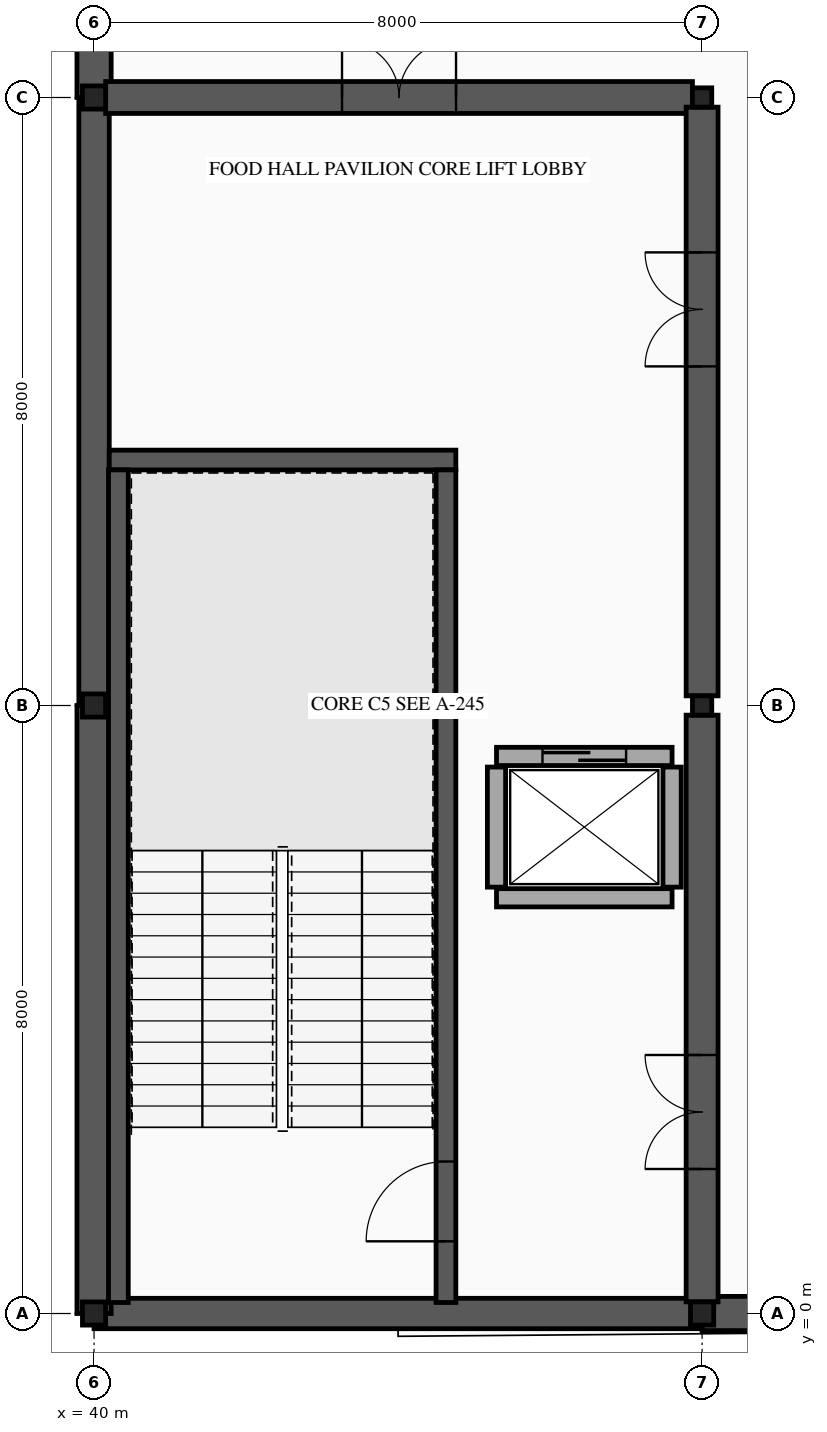
"""IFC4 building model, lengths in metres.
Left out: names, types, materials, properties, quantities, classifications, styles, units other than length and angle.
Written with IfcOpenShell. Run it as: python <this file> out.ifc"""

import sys

from ifc_helpers import new_model, si_unit, direction, frame, frame_2d, origin, origin_2d, place, context, subcontext, project, spatial, rectangle, hollow_rectangle, extrude, element, fill, save


model = new_model("IFC4")
c1 = context("Model", 3, precision=1e-05, world=origin(), true_north=direction((0.0, 1.0)))
c2 = subcontext(c1, "Body", "Model", "MODEL_VIEW")
j1 = project(units=[si_unit("LENGTHUNIT", "METRE"), si_unit("PLANEANGLEUNIT", "RADIAN")], contexts=[c1])
p1 = place(None, origin())
s1 = spatial("IfcSite", under=j1, at=p1, CompositionType="ELEMENT")
p2 = place(p1, origin())
s2 = spatial("IfcBuilding", under=s1, at=p2, CompositionType="ELEMENT")
p3 = place(p2, frame((0.0, 0.0, -4.8)))
s3 = spatial("IfcBuildingStorey", under=s2, at=p3, CompositionType="ELEMENT", Elevation=-4.8)
for number, where, z_axis, x_axis in (
    (1, (40.0, 0.0, 0.0), (0.0, 0.0, 1.0), (1.0, 0.0, 0.0)),
    (2, (40.0, 8.0, 0.0), (0.0, 0.0, 1.0), (1.0, 0.0, 0.0)),
    (3, (40.0, 16.0, 0.0), (0.0, 0.0, 1.0), (1.0, 0.0, 0.0)),
    (4, (48.0, 0.0, 0.0), (0.0, 0.0, 1.0), (1.0, 0.0, 0.0)),
):
    element("IfcColumn", number, at=place(p3, frame(where, z_axis=z_axis, x_axis=x_axis)), inside=s3, PredefinedType="COLUMN", context=c2, shape_type="SweptSolid", body=[
        extrude(hollow_rectangle(XDim=0.305, YDim=0.305, WallThickness=0.012, InnerFilletRadius=0.012, OuterFilletRadius=0.024, at=origin_2d()), origin(), (0.0, 0.0, 1.0), 4.8),
    ])
for number, where, z_axis, x_axis in (
    (5, (48.0, 8.0, 0.0), (0.0, 0.0, 1.0), (1.0, 0.0, 0.0)),
    (6, (48.0, 16.0, 0.0), (0.0, 0.0, 1.0), (1.0, 0.0, 0.0)),
):
    element("IfcColumn", number, at=place(p3, frame(where, z_axis=z_axis, x_axis=x_axis)), inside=s3, PredefinedType="COLUMN", context=c2, shape_type="SweptSolid", body=[
        extrude(hollow_rectangle(XDim=0.254, YDim=0.254, WallThickness=0.009, InnerFilletRadius=0.009, OuterFilletRadius=0.018, at=origin_2d()), origin(), (0.0, 0.0, 1.0), 4.8),
    ])
p4 = place(p3, frame((56.0, 0.0, 0.0), z_axis=(0.0, 0.0, 1.0), x_axis=(-1.0, 0.0, 0.0)))
e7 = element("IfcWall", 7, at=p4, inside=s3, PredefinedType="USERDEFINED", context=c2, shape_type="SweptSolid", body=[
    extrude(rectangle(XDim=8.0, YDim=0.45, at=frame_2d((4.0, 0.0))), origin(), (0.0, 0.0, 1.0), 4.5),
])
p5 = place(p3, frame((48.0, 0.0, 0.0), z_axis=(0.0, 0.0, 1.0), x_axis=(-1.0, 0.0, 0.0)))
e8 = element("IfcWall", 8, at=p5, inside=s3, PredefinedType="USERDEFINED", context=c2, shape_type="SweptSolid", body=[
    extrude(rectangle(XDim=8.0, YDim=0.4, at=frame_2d((4.0, 0.0))), origin(), (0.0, 0.0, 1.0), 4.5),
])
p6 = place(p3, frame((40.0, 0.0, 0.0), z_axis=(0.0, 0.0, 1.0), x_axis=(0.0, 1.0, 0.0)))
e9 = element("IfcWall", 9, at=p6, inside=s3, PredefinedType="USERDEFINED", context=c2, shape_type="SweptSolid", body=[
    extrude(rectangle(XDim=8.0, YDim=0.45, at=frame_2d((4.0, 0.0))), origin(), (0.0, 0.0, 1.0), 4.5),
])
p7 = place(p3, frame((40.0, 8.0, 0.0), z_axis=(0.0, 0.0, 1.0), x_axis=(0.0, 1.0, 0.0)))
e10 = element("IfcWall", 10, at=p7, inside=s3, PredefinedType="USERDEFINED", context=c2, shape_type="SweptSolid", body=[
    extrude(rectangle(XDim=8.0, YDim=0.4, at=frame_2d((4.0, 0.0))), origin(), (0.0, 0.0, 1.0), 4.5),
])
p8 = place(p3, frame((40.0, 16.0, 0.0), z_axis=(0.0, 0.0, 1.0), x_axis=(0.0, 1.0, 0.0)))
e11 = element("IfcWall", 11, at=p8, inside=s3, PredefinedType="USERDEFINED", context=c2, shape_type="SweptSolid", body=[
    extrude(rectangle(XDim=8.0, YDim=0.45, at=frame_2d((4.0, 0.0))), origin(), (0.0, 0.0, 1.0), 4.5),
])
p9 = place(p3, frame((40.2, 11.23, 0.0), z_axis=(0.0, 0.0, 1.0), x_axis=(1.0, 0.0, 0.0)))
e12 = element("IfcWall", 12, at=p9, inside=s3, PredefinedType="SHEAR", context=c2, shape_type="SweptSolid", body=[
    extrude(rectangle(XDim=4.56, YDim=0.26, at=frame_2d((2.28, 0.0))), origin(), (0.0, 0.0, 1.0), 4.58),
])
p10 = place(p3, frame((40.32, 0.145, 0.0), z_axis=(0.0, 0.0, 1.0), x_axis=(0.0, 1.0, 0.0)))
e13 = element("IfcWall", 13, at=p10, inside=s3, PredefinedType="SHEAR", context=c2, shape_type="SweptSolid", body=[
    extrude(rectangle(XDim=10.955, YDim=0.26, at=frame_2d((5.478, 0.0))), origin(), (0.0, 0.0, 1.0), 4.58),
])
p11 = place(p3, frame((44.63, 0.145, 0.0), z_axis=(0.0, 0.0, 1.0), x_axis=(0.0, 1.0, 0.0)))
e14 = element("IfcWall", 14, at=p11, inside=s3, PredefinedType="SHEAR", context=c2, shape_type="SweptSolid", body=[
    extrude(rectangle(XDim=10.955, YDim=0.26, at=frame_2d((5.478, 0.0))), origin(), (0.0, 0.0, 1.0), 4.58),
])
p12 = place(p11, frame((0.805, 0.0, 0.0)))
e15 = element("IfcOpeningElement", 15, at=p12, cuts=e14, PredefinedType="OPENING", context=c2, shape_type="SweptSolid", body=[
    extrude(rectangle(XDim=1.05, YDim=2.15, at=frame_2d((0.525, 1.075))), frame((0.0, 0.14, 0.0), z_axis=(0.0, -1.0, 0.0), x_axis=(1.0, 0.0, 0.0)), (0.0, 0.0, 1.0), 0.28),
])
p13 = place(p3, frame((40.153, 16.0, 0.0), z_axis=(0.0, 0.0, 1.0), x_axis=(1.0, 0.0, 0.0)))
e16 = element("IfcWall", 16, at=p13, inside=s3, PredefinedType="SHEAR", context=c2, shape_type="SweptSolid", body=[
    extrude(rectangle(XDim=7.72, YDim=0.42, at=frame_2d((3.86, 0.0))), origin(), (0.0, 0.0, 1.0), 4.58),
])
p14 = place(p13, frame((3.11, 0.0, 0.0)))
e17 = element("IfcOpeningElement", 17, at=p14, cuts=e16, PredefinedType="OPENING", context=c2, shape_type="SweptSolid", body=[
    extrude(rectangle(XDim=1.5, YDim=2.15, at=frame_2d((0.75, 1.075))), frame((0.0, 0.22, 0.0), z_axis=(0.0, -1.0, 0.0), x_axis=(1.0, 0.0, 0.0)), (0.0, 0.0, 1.0), 0.44),
])
p15 = place(p3, frame((48.0, 0.153, 0.0), z_axis=(0.0, 0.0, 1.0), x_axis=(0.0, 1.0, 0.0)))
e18 = element("IfcWall", 18, at=p15, inside=s3, PredefinedType="SHEAR", context=c2, shape_type="SweptSolid", body=[
    extrude(rectangle(XDim=7.72, YDim=0.42, at=frame_2d((3.86, 0.0))), origin(), (0.0, 0.0, 1.0), 4.58),
])
p16 = place(p15, frame((1.749, 0.0, 0.0)))
e19 = element("IfcOpeningElement", 19, at=p16, cuts=e18, PredefinedType="OPENING", context=c2, shape_type="SweptSolid", body=[
    extrude(rectangle(XDim=1.5, YDim=2.15, at=frame_2d((0.75, 1.075))), frame((0.0, 0.22, 0.0), z_axis=(0.0, -1.0, 0.0), x_axis=(1.0, 0.0, 0.0)), (0.0, 0.0, 1.0), 0.44),
])
p17 = place(p3, frame((48.0, 8.127, 0.0), z_axis=(0.0, 0.0, 1.0), x_axis=(0.0, 1.0, 0.0)))
e20 = element("IfcWall", 20, at=p17, inside=s3, PredefinedType="SHEAR", context=c2, shape_type="SweptSolid", body=[
    extrude(rectangle(XDim=7.746, YDim=0.42, at=frame_2d((3.873, 0.0))), origin(), (0.0, 0.0, 1.0), 4.58),
])
p18 = place(p17, frame((4.335, 0.0, 0.0)))
e21 = element("IfcOpeningElement", 21, at=p18, cuts=e20, PredefinedType="OPENING", context=c2, shape_type="SweptSolid", body=[
    extrude(rectangle(XDim=1.5, YDim=2.15, at=frame_2d((0.75, 1.075))), frame((0.0, 0.22, 0.0), z_axis=(0.0, -1.0, 0.0), x_axis=(1.0, 0.0, 0.0)), (0.0, 0.0, 1.0), 0.44),
])
p19 = place(p3, frame((45.295, 7.33, 0.0), z_axis=(0.0, 0.0, 1.0), x_axis=(1.0, 0.0, 0.0)))
e22 = element("IfcWall", 22, at=p19, inside=s3, PredefinedType="PARTITIONING", context=c2, shape_type="SweptSolid", body=[
    extrude(rectangle(XDim=2.31, YDim=0.24, at=frame_2d((1.155, 0.0))), origin(), (0.0, 0.0, 1.0), 4.58),
])
p20 = place(p19, frame((0.605, 0.0, 0.0)))
e23 = element("IfcOpeningElement", 23, at=p20, cuts=e22, PredefinedType="OPENING", context=c2, shape_type="SweptSolid", body=[
    extrude(rectangle(XDim=1.1, YDim=2.15, at=frame_2d((0.55, 1.075))), frame((0.0, 0.13, 0.0), z_axis=(0.0, -1.0, 0.0), x_axis=(1.0, 0.0, 0.0)), (0.0, 0.0, 1.0), 0.26),
])
p21 = place(p3, frame((45.295, 5.47, 0.0), z_axis=(0.0, 0.0, 1.0), x_axis=(1.0, 0.0, 0.0)))
e24 = element("IfcWall", 24, at=p21, inside=s3, PredefinedType="PARTITIONING", context=c2, shape_type="SweptSolid", body=[
    extrude(rectangle(XDim=2.31, YDim=0.24, at=frame_2d((1.155, 0.0))), origin(), (0.0, 0.0, 1.0), 4.58),
])
for number, where, z_axis, x_axis in (
    (25, (45.295, 5.61, 0.0), (0.0, 0.0, 1.0), (0.0, 1.0, 0.0)),
    (26, (47.605, 5.61, 0.0), (0.0, 0.0, 1.0), (0.0, 1.0, 0.0)),
):
    element("IfcWall", number, at=place(p3, frame(where, z_axis=z_axis, x_axis=x_axis)), inside=s3, PredefinedType="PARTITIONING", context=c2, shape_type="SweptSolid", body=[
        extrude(rectangle(XDim=1.58, YDim=0.24, at=frame_2d((0.79, 0.0))), origin(), (0.0, 0.0, 1.0), 4.58),
    ])
p22 = place(p12, origin())
e27 = element("IfcDoor", 27, at=p22, inside=s3, OperationType="SINGLE_SWING_LEFT", PredefinedType="DOOR", context=c2, shape_type="SweptSolid", body=[
    extrude(rectangle(XDim=1.05, YDim=2.15, at=frame_2d((0.525, 1.075))), frame((0.0, 0.025, 0.0), z_axis=(0.0, -1.0, 0.0), x_axis=(1.0, 0.0, 0.0)), (0.0, 0.0, 1.0), 0.05),
])
fill(e15, e27)
p23 = place(p14, origin())
e28 = element("IfcDoor", 28, at=p23, inside=s3, OperationType="DOUBLE_DOOR_SINGLE_SWING", PredefinedType="DOOR", context=c2, shape_type="SweptSolid", body=[
    extrude(rectangle(XDim=1.5, YDim=2.15, at=frame_2d((0.75, 1.075))), frame((0.0, 0.025, 0.0), z_axis=(0.0, -1.0, 0.0), x_axis=(1.0, 0.0, 0.0)), (0.0, 0.0, 1.0), 0.05),
])
fill(e17, e28)
p24 = place(p16, origin())
e29 = element("IfcDoor", 29, at=p24, inside=s3, OperationType="DOUBLE_DOOR_SINGLE_SWING", PredefinedType="DOOR", context=c2, shape_type="SweptSolid", body=[
    extrude(rectangle(XDim=1.5, YDim=2.15, at=frame_2d((0.75, 1.075))), frame((0.0, 0.025, 0.0), z_axis=(0.0, -1.0, 0.0), x_axis=(1.0, 0.0, 0.0)), (0.0, 0.0, 1.0), 0.05),
])
fill(e19, e29)
p25 = place(p18, origin())
e30 = element("IfcDoor", 30, at=p25, inside=s3, OperationType="DOUBLE_DOOR_SINGLE_SWING", PredefinedType="DOOR", context=c2, shape_type="SweptSolid", body=[
    extrude(rectangle(XDim=1.5, YDim=2.15, at=frame_2d((0.75, 1.075))), frame((0.0, 0.025, 0.0), z_axis=(0.0, -1.0, 0.0), x_axis=(1.0, 0.0, 0.0)), (0.0, 0.0, 1.0), 0.05),
])
fill(e21, e30)
p26 = place(p20, origin())
e31 = element("IfcDoor", 31, at=p26, inside=s3, OperationType="SLIDING_TO_LEFT", PredefinedType="DOOR", context=c2, shape_type="SweptSolid", body=[
    extrude(rectangle(XDim=1.1, YDim=2.15, at=frame_2d((0.55, 1.075))), frame((0.0, 0.025, 0.0), z_axis=(0.0, -1.0, 0.0), x_axis=(1.0, 0.0, 0.0)), (0.0, 0.0, 1.0), 0.05),
])
fill(e23, e31)
save(model, sys.argv[1])
